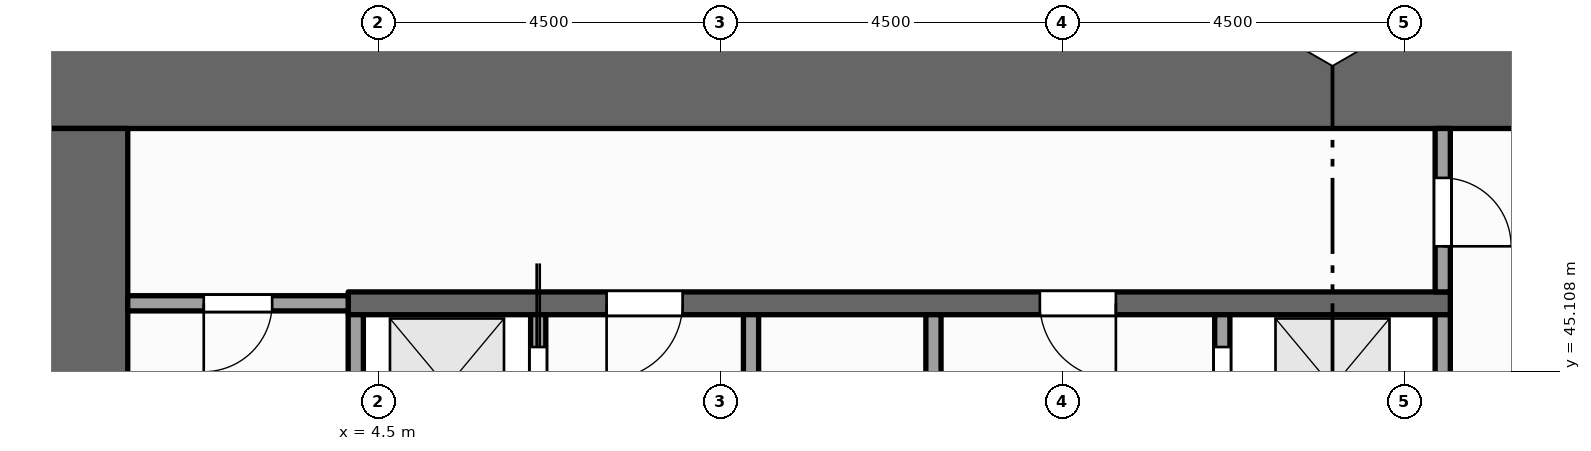
"""IFC4 building model, lengths in metres.
Left out: names, types, materials, properties, quantities, classifications, styles, units other than length and angle.
Written with IfcOpenShell. Run it as: python <this file> out.ifc"""

import sys

from ifc_helpers import new_model, si_unit, direction, frame, frame_2d, origin, place, context, subcontext, project, spatial, rectangle, extrude, element, fill, save


model = new_model("IFC4")
c1 = context("Model", 3, precision=1e-05, world=origin(), true_north=direction((0.0, 1.0)))
c2 = subcontext(c1, "Body", "Model", "MODEL_VIEW")
j1 = project(units=[si_unit("LENGTHUNIT", "METRE"), si_unit("PLANEANGLEUNIT", "RADIAN")], contexts=[c1])
p1 = place(None, origin())
s1 = spatial("IfcSite", under=j1, at=p1, CompositionType="ELEMENT")
p2 = place(p1, origin())
s2 = spatial("IfcBuilding", under=s1, at=p2, CompositionType="ELEMENT")
p3 = place(p2, frame((0.0, 0.0, 115.0)))
s3 = spatial("IfcBuildingStorey", under=s2, at=p3, CompositionType="ELEMENT", Elevation=115.0)
p4 = place(p3, frame((0.0, 48.9, -0.15), z_axis=(0.0, 0.0, 1.0), x_axis=(1.0, 0.0, 0.0)))
e1 = element("IfcWall", 1, at=p4, inside=s3, PredefinedType="SHEAR", context=c2, shape_type="SweptSolid", body=[
    extrude(rectangle(XDim=22.5, YDim=1.2, at=frame_2d((11.25, 0.0))), origin(), (0.0, 0.0, 1.0), 4.0),
])
p5 = place(p3, frame((0.6, 37.2, -0.15), z_axis=(0.0, 0.0, 1.0), x_axis=(0.0, 1.0, 0.0)))
e2 = element("IfcWall", 2, at=p5, inside=s3, PredefinedType="SHEAR", context=c2, shape_type="SweptSolid", body=[
    extrude(rectangle(XDim=11.1, YDim=1.2, at=frame_2d((5.55, 0.0))), origin(), (0.0, 0.0, 1.0), 4.0),
])
p6 = place(p3, frame((4.2, 43.525, 0.0), z_axis=(0.0, 0.0, 1.0), x_axis=(0.0, 1.0, 0.0)))
e3 = element("IfcWall", 3, at=p6, inside=s3, PredefinedType="SOLIDWALL", context=c2, shape_type="SweptSolid", body=[
    extrude(rectangle(XDim=2.325, YDim=0.2, at=frame_2d((1.163, 0.0))), origin(), (0.0, 0.0, 1.0), 3.85),
])
p7 = place(p3, frame((6.6, 37.2, 0.0), z_axis=(0.0, 0.0, 1.0), x_axis=(0.0, 1.0, 0.0)))
e4 = element("IfcWall", 4, at=p7, inside=s3, PredefinedType="SOLIDWALL", context=c2, shape_type="SweptSolid", body=[
    extrude(rectangle(XDim=8.65, YDim=0.2, at=frame_2d((4.325, 0.0))), origin(), (0.0, 0.0, 1.0), 3.85),
])
p8 = place(p7, frame((0.5, 0.0, 0.012)))
e5 = element("IfcOpeningElement", 5, at=p8, cuts=e4, PredefinedType="OPENING", context=c2, shape_type="SweptSolid", body=[
    extrude(rectangle(XDim=1.1, YDim=2.1, at=frame_2d((0.55, 1.05))), frame((0.0, 0.11, 0.0), z_axis=(0.0, -1.0, 0.0), x_axis=(1.0, 0.0, 0.0)), (0.0, 0.0, 1.0), 0.22),
])
p9 = place(p7, frame((2.75, 0.0, 0.012)))
e6 = element("IfcOpeningElement", 6, at=p9, cuts=e4, PredefinedType="OPENING", context=c2, shape_type="SweptSolid", body=[
    extrude(rectangle(XDim=1.1, YDim=2.1, at=frame_2d((0.55, 1.05))), frame((0.0, 0.11, 0.0), z_axis=(0.0, -1.0, 0.0), x_axis=(1.0, 0.0, 0.0)), (0.0, 0.0, 1.0), 0.22),
])
p10 = place(p7, frame((4.95, 0.0, 0.012)))
e7 = element("IfcOpeningElement", 7, at=p10, cuts=e4, PredefinedType="OPENING", context=c2, shape_type="SweptSolid", body=[
    extrude(rectangle(XDim=1.1, YDim=2.1, at=frame_2d((0.55, 1.05))), frame((0.0, 0.11, 0.0), z_axis=(0.0, -1.0, 0.0), x_axis=(1.0, 0.0, 0.0)), (0.0, 0.0, 1.0), 0.22),
])
p11 = place(p7, frame((7.125, 0.0, 0.012)))
e8 = element("IfcOpeningElement", 8, at=p11, cuts=e4, PredefinedType="OPENING", context=c2, shape_type="SweptSolid", body=[
    extrude(rectangle(XDim=1.1, YDim=2.1, at=frame_2d((0.55, 1.05))), frame((0.0, 0.11, 0.0), z_axis=(0.0, -1.0, 0.0), x_axis=(1.0, 0.0, 0.0)), (0.0, 0.0, 1.0), 0.22),
])
p12 = place(p3, frame((9.4, 37.2, 0.0), z_axis=(0.0, 0.0, 1.0), x_axis=(0.0, 1.0, 0.0)))
e9 = element("IfcWall", 9, at=p12, inside=s3, PredefinedType="PARTITIONING", context=c2, shape_type="SweptSolid", body=[
    extrude(rectangle(XDim=8.65, YDim=0.2, at=frame_2d((4.325, 0.0))), origin(), (0.0, 0.0, 1.0), 3.85),
])
p13 = place(p12, frame((3.875, 0.0, 0.0)))
e10 = element("IfcOpeningElement", 10, at=p13, cuts=e9, PredefinedType="OPENING", context=c2, shape_type="SweptSolid", body=[
    extrude(rectangle(XDim=0.9, YDim=2.1, at=frame_2d((0.45, 1.05))), frame((0.0, 0.11, 0.0), z_axis=(0.0, -1.0, 0.0), x_axis=(1.0, 0.0, 0.0)), (0.0, 0.0, 1.0), 0.22),
])
p14 = place(p3, frame((11.8, 37.2, 0.0), z_axis=(0.0, 0.0, 1.0), x_axis=(0.0, 1.0, 0.0)))
e11 = element("IfcWall", 11, at=p14, inside=s3, PredefinedType="PARTITIONING", context=c2, shape_type="SweptSolid", body=[
    extrude(rectangle(XDim=8.65, YDim=0.2, at=frame_2d((4.325, 0.0))), origin(), (0.0, 0.0, 1.0), 3.85),
])
p15 = place(p3, frame((15.6, 43.7, 0.0), z_axis=(0.0, 0.0, 1.0), x_axis=(0.0, 1.0, 0.0)))
e12 = element("IfcWall", 12, at=p15, inside=s3, PredefinedType="SOLIDWALL", context=c2, shape_type="SweptSolid", body=[
    extrude(rectangle(XDim=2.15, YDim=0.2, at=frame_2d((1.075, 0.0))), origin(), (0.0, 0.0, 1.0), 3.85),
])
p16 = place(p15, frame((0.625, 0.0, 0.012)))
e13 = element("IfcOpeningElement", 13, at=p16, cuts=e12, PredefinedType="OPENING", context=c2, shape_type="SweptSolid", body=[
    extrude(rectangle(XDim=1.1, YDim=2.1, at=frame_2d((0.55, 1.05))), frame((0.0, 0.11, 0.0), z_axis=(0.0, -1.0, 0.0), x_axis=(1.0, 0.0, 0.0)), (0.0, 0.0, 1.0), 0.22),
])
p17 = place(p3, frame((18.5, 43.7, 0.0), z_axis=(0.0, 0.0, 1.0), x_axis=(0.0, 1.0, 0.0)))
e14 = element("IfcWall", 14, at=p17, inside=s3, PredefinedType="SOLIDWALL", context=c2, shape_type="SweptSolid", body=[
    extrude(rectangle(XDim=2.15, YDim=0.2, at=frame_2d((1.075, 0.0))), origin(), (0.0, 0.0, 1.0), 3.85),
])
p18 = place(p3, frame((18.5, 46.15, 0.0), z_axis=(0.0, 0.0, 1.0), x_axis=(0.0, 1.0, 0.0)))
e15 = element("IfcWall", 15, at=p18, inside=s3, PredefinedType="PARTITIONING", context=c2, shape_type="SweptSolid", body=[
    extrude(rectangle(XDim=2.15, YDim=0.2, at=frame_2d((1.075, 0.0))), origin(), (0.0, 0.0, 1.0), 3.85),
])
p19 = place(p18, frame((0.6, 0.0, 0.0)))
e16 = element("IfcOpeningElement", 16, at=p19, cuts=e15, PredefinedType="OPENING", context=c2, shape_type="SweptSolid", body=[
    extrude(rectangle(XDim=0.9, YDim=2.1, at=frame_2d((0.45, 1.05))), frame((0.0, 0.11, 0.0), z_axis=(0.0, -1.0, 0.0), x_axis=(1.0, 0.0, 0.0)), (0.0, 0.0, 1.0), 0.22),
])
p20 = place(p3, frame((1.2, 46.0, 0.0), z_axis=(0.0, 0.0, 1.0), x_axis=(1.0, 0.0, 0.0)))
e17 = element("IfcWall", 17, at=p20, inside=s3, PredefinedType="PARTITIONING", context=c2, shape_type="SweptSolid", body=[
    extrude(rectangle(XDim=2.9, YDim=0.2, at=frame_2d((1.45, 0.0))), origin(), (0.0, 0.0, 1.0), 3.85),
])
p21 = place(p20, frame((1.0, 0.0, 0.0)))
e18 = element("IfcOpeningElement", 18, at=p21, cuts=e17, PredefinedType="OPENING", context=c2, shape_type="SweptSolid", body=[
    extrude(rectangle(XDim=0.9, YDim=2.1, at=frame_2d((0.45, 1.05))), frame((0.0, 0.11, 0.0), z_axis=(0.0, -1.0, 0.0), x_axis=(1.0, 0.0, 0.0)), (0.0, 0.0, 1.0), 0.22),
])
p22 = place(p3, frame((4.1, 46.0, 0.0), z_axis=(0.0, 0.0, 1.0), x_axis=(1.0, 0.0, 0.0)))
e19 = element("IfcWall", 19, at=p22, inside=s3, PredefinedType="SHEAR", context=c2, shape_type="SweptSolid", body=[
    extrude(rectangle(XDim=14.5, YDim=0.3, at=frame_2d((7.25, 0.0))), origin(), (0.0, 0.0, 1.0), 3.85),
])
p23 = place(p22, frame((3.4, 0.0, 0.0)))
e20 = element("IfcOpeningElement", 20, at=p23, cuts=e19, PredefinedType="OPENING", context=c2, shape_type="SweptSolid", body=[
    extrude(rectangle(XDim=1.0, YDim=2.1, at=frame_2d((0.5, 1.05))), frame((0.0, 0.16, 0.0), z_axis=(0.0, -1.0, 0.0), x_axis=(1.0, 0.0, 0.0)), (0.0, 0.0, 1.0), 0.32),
])
p24 = place(p22, frame((9.1, 0.0, 0.0)))
e21 = element("IfcOpeningElement", 21, at=p24, cuts=e19, PredefinedType="OPENING", context=c2, shape_type="SweptSolid", body=[
    extrude(rectangle(XDim=1.0, YDim=2.1, at=frame_2d((0.5, 1.05))), frame((0.0, 0.16, 0.0), z_axis=(0.0, -1.0, 0.0), x_axis=(1.0, 0.0, 0.0)), (0.0, 0.0, 1.0), 0.32),
])
p25 = place(p11, origin())
e22 = element("IfcDoor", 22, at=p25, inside=s3, OperationType="SLIDING_TO_RIGHT", PredefinedType="DOOR", context=c2, shape_type="SweptSolid", body=[
    extrude(rectangle(XDim=1.1, YDim=2.1, at=frame_2d((0.55, 1.05))), frame((0.0, 0.025, 0.0), z_axis=(0.0, -1.0, 0.0), x_axis=(1.0, 0.0, 0.0)), (0.0, 0.0, 1.0), 0.05),
])
fill(e8, e22)
p26 = place(p16, origin())
e23 = element("IfcDoor", 23, at=p26, inside=s3, OperationType="SLIDING_TO_LEFT", PredefinedType="DOOR", context=c2, shape_type="SweptSolid", body=[
    extrude(rectangle(XDim=1.1, YDim=2.1, at=frame_2d((0.55, 1.05))), frame((0.0, 0.025, 0.0), z_axis=(0.0, -1.0, 0.0), x_axis=(1.0, 0.0, 0.0)), (0.0, 0.0, 1.0), 0.05),
])
fill(e13, e23)
p27 = place(p23, origin())
e24 = element("IfcDoor", 24, at=p27, inside=s3, OperationType="SINGLE_SWING_LEFT", PredefinedType="DOOR", context=c2, shape_type="SweptSolid", body=[
    extrude(rectangle(XDim=1.0, YDim=2.1, at=frame_2d((0.5, 1.05))), frame((0.0, 0.025, 0.0), z_axis=(0.0, -1.0, 0.0), x_axis=(1.0, 0.0, 0.0)), (0.0, 0.0, 1.0), 0.05),
])
fill(e20, e24)
p28 = place(p24, origin())
e25 = element("IfcDoor", 25, at=p28, inside=s3, OperationType="SINGLE_SWING_RIGHT", PredefinedType="DOOR", context=c2, shape_type="SweptSolid", body=[
    extrude(rectangle(XDim=1.0, YDim=2.1, at=frame_2d((0.5, 1.05))), frame((0.0, 0.025, 0.0), z_axis=(0.0, -1.0, 0.0), x_axis=(1.0, 0.0, 0.0)), (0.0, 0.0, 1.0), 0.05),
])
fill(e21, e25)
p29 = place(p21, origin())
e26 = element("IfcDoor", 26, at=p29, inside=s3, OperationType="SINGLE_SWING_LEFT", PredefinedType="DOOR", context=c2, shape_type="SweptSolid", body=[
    extrude(rectangle(XDim=0.9, YDim=2.1, at=frame_2d((0.45, 1.05))), frame((0.0, 0.025, 0.0), z_axis=(0.0, -1.0, 0.0), x_axis=(1.0, 0.0, 0.0)), (0.0, 0.0, 1.0), 0.05),
])
fill(e18, e26)
p30 = place(p19, origin())
e27 = element("IfcDoor", 27, at=p30, inside=s3, OperationType="SINGLE_SWING_LEFT", PredefinedType="DOOR", context=c2, shape_type="SweptSolid", body=[
    extrude(rectangle(XDim=0.9, YDim=2.1, at=frame_2d((0.45, 1.05))), frame((0.0, 0.025, 0.0), z_axis=(0.0, -1.0, 0.0), x_axis=(1.0, 0.0, 0.0)), (0.0, 0.0, 1.0), 0.05),
])
fill(e16, e27)
save(model, sys.argv[1])
